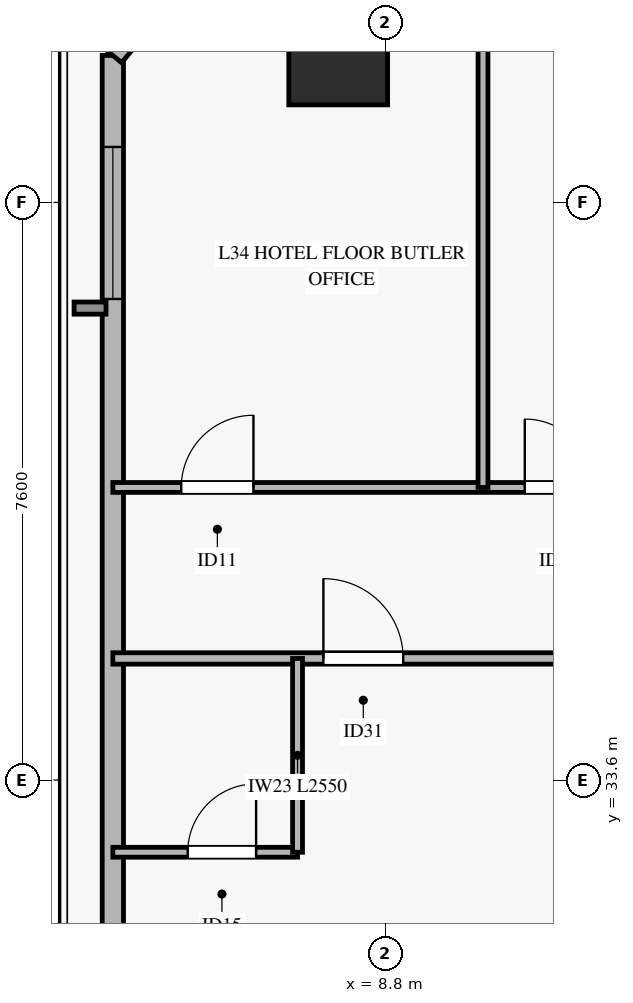
"""IFC4 building model, lengths in metres.
Left out: names, types, materials, properties, quantities, classifications, styles, units other than length and angle.
Written with IfcOpenShell. Run it as: python <this file> out.ifc"""

import sys

from ifc_helpers import new_model, si_unit, direction, frame, frame_2d, origin, origin_2d, place, context, subcontext, project, spatial, rectangle, hollow_rectangle, extrude, source, transform, mapped, element, fill, save


model = new_model("IFC4")
c1 = context("Model", 3, precision=1e-05, world=origin(), true_north=direction((0.0, 1.0)))
c2 = subcontext(c1, "Body", "Model", "MODEL_VIEW")
j1 = project(units=[si_unit("LENGTHUNIT", "METRE"), si_unit("PLANEANGLEUNIT", "RADIAN")], contexts=[c1])
p1 = place(None, origin())
s1 = spatial("IfcSite", under=j1, at=p1, CompositionType="ELEMENT")
p2 = place(p1, origin())
s2 = spatial("IfcBuilding", under=s1, at=p2, CompositionType="ELEMENT")
p3 = place(p2, frame((0.0, 0.0, 141.2)))
s3 = spatial("IfcBuildingStorey", under=s2, at=p3, CompositionType="ELEMENT", Elevation=141.2)
m1 = source(origin(), c2, "Body", "SweptSolid", [
    extrude(hollow_rectangle(XDim=1.3, YDim=1.3, WallThickness=0.06, at=origin_2d()), origin(), (0.0, 0.0, 1.0), 3.22),
])
p4 = place(p3, frame((8.179, 43.134, 0.0), z_axis=(0.0, 0.0, 1.0), x_axis=(1.0, 0.0, 0.0)))
e1 = element("IfcColumn", 1, at=p4, inside=s3, PredefinedType="COLUMN", context=c2, shape_type="MappedRepresentation", body=[
    mapped(m1, transform((0.0, 0.0, 0.0), x_axis=(1.0, 0.0, 0.0), y_axis=(0.0, 1.0, 0.0), z_axis=(0.0, 0.0, 1.0), scale=1.0)),
])
p5 = place(p3, frame((5.214, 27.472, 0.0), z_axis=(0.0, 0.0, 1.0), x_axis=(0.0, 1.0, 0.0)))
e2 = element("IfcWall", 2, at=p5, inside=s3, PredefinedType="SOLIDWALL", context=c2, shape_type="SweptSolid", body=[
    extrude(rectangle(XDim=15.662, YDim=0.28, at=frame_2d((7.831, 0.0))), origin(), (0.0, 0.0, 1.0), 2.7),
])
p6 = place(p5, frame((1.823, 0.0, 0.45)))
e3 = element("IfcOpeningElement", 3, at=p6, cuts=e2, PredefinedType="OPENING", context=c2, shape_type="SweptSolid", body=[
    extrude(rectangle(XDim=2.0, YDim=2.0, at=frame_2d((1.0, 1.0))), frame((0.0, 0.15, 0.0), z_axis=(0.0, -1.0, 0.0), x_axis=(1.0, 0.0, 0.0)), (0.0, 0.0, 1.0), 0.3),
])
p7 = place(p5, frame((12.458, 0.0, 0.45)))
e4 = element("IfcOpeningElement", 4, at=p7, cuts=e2, PredefinedType="OPENING", context=c2, shape_type="SweptSolid", body=[
    extrude(rectangle(XDim=2.0, YDim=2.0, at=frame_2d((1.0, 1.0))), frame((0.0, 0.15, 0.0), z_axis=(0.0, -1.0, 0.0), x_axis=(1.0, 0.0, 0.0)), (0.0, 0.0, 1.0), 0.3),
])
p8 = place(p3, frame((7.779, 46.25, 0.0), z_axis=(0.0, 0.0, 1.0), x_axis=(-0.63553760815, -0.772069911748, 0.0)))
e5 = element("IfcWall", 5, at=p8, inside=s3, PredefinedType="SOLIDWALL", context=c2, shape_type="SweptSolid", body=[
    extrude(rectangle(XDim=4.036, YDim=0.3, at=frame_2d((2.018, 0.0))), origin(), (0.0, 0.0, 1.0), 2.7),
])
p9 = place(p8, frame((1.218, 0.0, 0.45)))
e6 = element("IfcOpeningElement", 6, at=p9, cuts=e5, PredefinedType="OPENING", context=c2, shape_type="SweptSolid", body=[
    extrude(rectangle(XDim=1.6, YDim=2.0, at=frame_2d((0.8, 1.0))), frame((0.0, 0.16, 0.0), z_axis=(0.0, -1.0, 0.0), x_axis=(1.0, 0.0, 0.0)), (0.0, 0.0, 1.0), 0.32),
])
p10 = place(p3, frame((5.214, 35.2, 0.0), z_axis=(0.0, 0.0, 1.0), x_axis=(1.0, 0.0, 0.0)))
e7 = element("IfcWall", 7, at=p10, inside=s3, PredefinedType="PARTITIONING", context=c2, shape_type="SweptSolid", body=[
    extrude(rectangle(XDim=59.972, YDim=0.15, at=frame_2d((29.986, 0.0))), origin(), (0.0, 0.0, 1.0), 2.405),
])
p11 = place(p10, frame((2.77, 0.0, 0.0)))
e8 = element("IfcOpeningElement", 8, at=p11, cuts=e7, PredefinedType="OPENING", context=c2, shape_type="SweptSolid", body=[
    extrude(rectangle(XDim=1.05, YDim=2.15, at=frame_2d((0.525, 1.075))), frame((0.0, 0.085, 0.0), z_axis=(0.0, -1.0, 0.0), x_axis=(1.0, 0.0, 0.0)), (0.0, 0.0, 1.0), 0.17),
])
p12 = place(p10, frame((19.156, 0.0, 0.0)))
e9 = element("IfcOpeningElement", 9, at=p12, cuts=e7, PredefinedType="OPENING", context=c2, shape_type="SweptSolid", body=[
    extrude(rectangle(XDim=1.05, YDim=2.15, at=frame_2d((0.525, 1.075))), frame((0.0, 0.085, 0.0), z_axis=(0.0, -1.0, 0.0), x_axis=(1.0, 0.0, 0.0)), (0.0, 0.0, 1.0), 0.17),
])
p13 = place(p10, frame((24.662, 0.0, 0.0)))
e10 = element("IfcOpeningElement", 10, at=p13, cuts=e7, PredefinedType="OPENING", context=c2, shape_type="SweptSolid", body=[
    extrude(rectangle(XDim=1.05, YDim=2.15, at=frame_2d((0.525, 1.075))), frame((0.0, 0.085, 0.0), z_axis=(0.0, -1.0, 0.0), x_axis=(1.0, 0.0, 0.0)), (0.0, 0.0, 1.0), 0.17),
])
p14 = place(p10, frame((29.462, 0.0, 0.0)))
e11 = element("IfcOpeningElement", 11, at=p14, cuts=e7, PredefinedType="OPENING", context=c2, shape_type="SweptSolid", body=[
    extrude(rectangle(XDim=1.05, YDim=2.15, at=frame_2d((0.525, 1.075))), frame((0.0, 0.085, 0.0), z_axis=(0.0, -1.0, 0.0), x_axis=(1.0, 0.0, 0.0)), (0.0, 0.0, 1.0), 0.17),
])
p15 = place(p10, frame((34.262, 0.0, 0.0)))
e12 = element("IfcOpeningElement", 12, at=p15, cuts=e7, PredefinedType="OPENING", context=c2, shape_type="SweptSolid", body=[
    extrude(rectangle(XDim=1.05, YDim=2.15, at=frame_2d((0.525, 1.075))), frame((0.0, 0.085, 0.0), z_axis=(0.0, -1.0, 0.0), x_axis=(1.0, 0.0, 0.0)), (0.0, 0.0, 1.0), 0.17),
])
p16 = place(p10, frame((38.806, 0.0, 0.0)))
e13 = element("IfcOpeningElement", 13, at=p16, cuts=e7, PredefinedType="OPENING", context=c2, shape_type="SweptSolid", body=[
    extrude(rectangle(XDim=1.05, YDim=2.15, at=frame_2d((0.525, 1.075))), frame((0.0, 0.085, 0.0), z_axis=(0.0, -1.0, 0.0), x_axis=(1.0, 0.0, 0.0)), (0.0, 0.0, 1.0), 0.17),
])
p17 = place(p10, frame((42.956, 0.0, 0.0)))
e14 = element("IfcOpeningElement", 14, at=p17, cuts=e7, PredefinedType="OPENING", context=c2, shape_type="SweptSolid", body=[
    extrude(rectangle(XDim=1.05, YDim=2.15, at=frame_2d((0.525, 1.075))), frame((0.0, 0.085, 0.0), z_axis=(0.0, -1.0, 0.0), x_axis=(1.0, 0.0, 0.0)), (0.0, 0.0, 1.0), 0.17),
])
p18 = place(p3, frame((5.214, 32.65, 0.0), z_axis=(0.0, 0.0, 1.0), x_axis=(1.0, 0.0, 0.0)))
e15 = element("IfcWall", 15, at=p18, inside=s3, PredefinedType="PARTITIONING", context=c2, shape_type="SweptSolid", body=[
    extrude(rectangle(XDim=2.43, YDim=0.13, at=frame_2d((1.215, 0.0))), origin(), (0.0, 0.0, 1.0), 2.705),
])
p19 = place(p18, frame((0.985, 0.0, 0.0)))
e16 = element("IfcOpeningElement", 16, at=p19, cuts=e15, PredefinedType="OPENING", context=c2, shape_type="SweptSolid", body=[
    extrude(rectangle(XDim=0.9, YDim=2.1, at=frame_2d((0.45, 1.05))), frame((0.0, 0.075, 0.0), z_axis=(0.0, -1.0, 0.0), x_axis=(1.0, 0.0, 0.0)), (0.0, 0.0, 1.0), 0.15),
])
p20 = place(p3, frame((7.644, 32.65, 0.0), z_axis=(0.0, 0.0, 1.0), x_axis=(0.0, 1.0, 0.0)))
e17 = element("IfcWall", 17, at=p20, inside=s3, PredefinedType="PARTITIONING", context=c2, shape_type="SweptSolid", body=[
    extrude(rectangle(XDim=2.55, YDim=0.13, at=frame_2d((1.275, 0.0))), origin(), (0.0, 0.0, 1.0), 3.22),
])
p21 = place(p3, frame((5.214, 37.45, 0.0), z_axis=(0.0, 0.0, 1.0), x_axis=(1.0, 0.0, 0.0)))
e18 = element("IfcWall", 18, at=p21, inside=s3, PredefinedType="PARTITIONING", context=c2, shape_type="SweptSolid", body=[
    extrude(rectangle(XDim=14.036, YDim=0.13, at=frame_2d((7.018, 0.0))), origin(), (0.0, 0.0, 1.0), 2.705),
])
p22 = place(p21, frame((0.9, 0.0, 0.0)))
e19 = element("IfcOpeningElement", 19, at=p22, cuts=e18, PredefinedType="OPENING", context=c2, shape_type="SweptSolid", body=[
    extrude(rectangle(XDim=0.95, YDim=2.1, at=frame_2d((0.475, 1.05))), frame((0.0, 0.075, 0.0), z_axis=(0.0, -1.0, 0.0), x_axis=(1.0, 0.0, 0.0)), (0.0, 0.0, 1.0), 0.15),
])
p23 = place(p21, frame((5.42, 0.0, 0.0)))
e20 = element("IfcOpeningElement", 20, at=p23, cuts=e18, PredefinedType="OPENING", context=c2, shape_type="SweptSolid", body=[
    extrude(rectangle(XDim=0.9, YDim=2.1, at=frame_2d((0.45, 1.05))), frame((0.0, 0.075, 0.0), z_axis=(0.0, -1.0, 0.0), x_axis=(1.0, 0.0, 0.0)), (0.0, 0.0, 1.0), 0.15),
])
p24 = place(p3, frame((10.084, 37.45, 0.0), z_axis=(0.0, 0.0, 1.0), x_axis=(0.0, 1.0, 0.0)))
e21 = element("IfcWall", 21, at=p24, inside=s3, PredefinedType="PARTITIONING", context=c2, shape_type="SweptSolid", body=[
    extrude(rectangle(XDim=8.8, YDim=0.13, at=frame_2d((4.4, 0.0))), origin(), (0.0, 0.0, 1.0), 3.22),
])
m2 = source(origin(), c2, "Body", "SweptSolid", [
    extrude(rectangle(XDim=2.0, YDim=2.0, at=frame_2d((1.0, 1.0))), frame((0.0, 0.03, 0.0), z_axis=(0.0, -1.0, 0.0), x_axis=(1.0, 0.0, 0.0)), (0.0, 0.0, 1.0), 0.06),
])
p25 = place(p7, origin())
e22 = element("IfcWindow", 22, at=p25, inside=s3, PartitioningType="SINGLE_PANEL", PredefinedType="WINDOW", context=c2, shape_type="MappedRepresentation", body=[
    mapped(m2, transform((0.0, 0.0, 0.0), x_axis=(1.0, 0.0, 0.0), y_axis=(0.0, 1.0, 0.0), z_axis=(0.0, 0.0, 1.0), scale=1.0)),
])
fill(e4, e22)
m3 = source(origin(), c2, "Body", "SweptSolid", [
    extrude(rectangle(XDim=1.05, YDim=2.15, at=frame_2d((0.525, 1.075))), frame((0.0, 0.025, 0.0), z_axis=(0.0, -1.0, 0.0), x_axis=(1.0, 0.0, 0.0)), (0.0, 0.0, 1.0), 0.05),
])
p26 = place(p11, origin())
e23 = element("IfcDoor", 23, at=p26, inside=s3, OperationType="SINGLE_SWING_LEFT", PredefinedType="DOOR", context=c2, shape_type="MappedRepresentation", body=[
    mapped(m3, transform((0.0, 0.0, 0.0), x_axis=(1.0, 0.0, 0.0), y_axis=(0.0, 1.0, 0.0), z_axis=(0.0, 0.0, 1.0), scale=1.0)),
])
fill(e8, e23)
m4 = source(origin(), c2, "Body", "SweptSolid", [
    extrude(rectangle(XDim=0.9, YDim=2.1, at=frame_2d((0.45, 1.05))), frame((0.0, 0.025, 0.0), z_axis=(0.0, -1.0, 0.0), x_axis=(1.0, 0.0, 0.0)), (0.0, 0.0, 1.0), 0.05),
])
p27 = place(p19, origin())
e24 = element("IfcDoor", 24, at=p27, inside=s3, OperationType="SINGLE_SWING_RIGHT", PredefinedType="DOOR", context=c2, shape_type="MappedRepresentation", body=[
    mapped(m4, transform((0.0, 0.0, 0.0), x_axis=(1.0, 0.0, 0.0), y_axis=(0.0, 1.0, 0.0), z_axis=(0.0, 0.0, 1.0), scale=1.0)),
])
fill(e16, e24)
m5 = source(origin(), c2, "Body", "SweptSolid", [
    extrude(rectangle(XDim=0.95, YDim=2.1, at=frame_2d((0.475, 1.05))), frame((0.0, 0.025, 0.0), z_axis=(0.0, -1.0, 0.0), x_axis=(1.0, 0.0, 0.0)), (0.0, 0.0, 1.0), 0.05),
])
p28 = place(p22, origin())
e25 = element("IfcDoor", 25, at=p28, inside=s3, OperationType="SINGLE_SWING_RIGHT", PredefinedType="DOOR", context=c2, shape_type="MappedRepresentation", body=[
    mapped(m5, transform((0.0, 0.0, 0.0), x_axis=(1.0, 0.0, 0.0), y_axis=(0.0, 1.0, 0.0), z_axis=(0.0, 0.0, 1.0), scale=1.0)),
])
fill(e19, e25)
p29 = place(p23, origin())
e26 = element("IfcDoor", 26, at=p29, inside=s3, OperationType="SINGLE_SWING_LEFT", PredefinedType="DOOR", context=c2, shape_type="MappedRepresentation", body=[
    mapped(m4, transform((0.0, 0.0, 0.0), x_axis=(1.0, 0.0, 0.0), y_axis=(0.0, 1.0, 0.0), z_axis=(0.0, 0.0, 1.0), scale=1.0)),
])
fill(e20, e26)
save(model, sys.argv[1])
